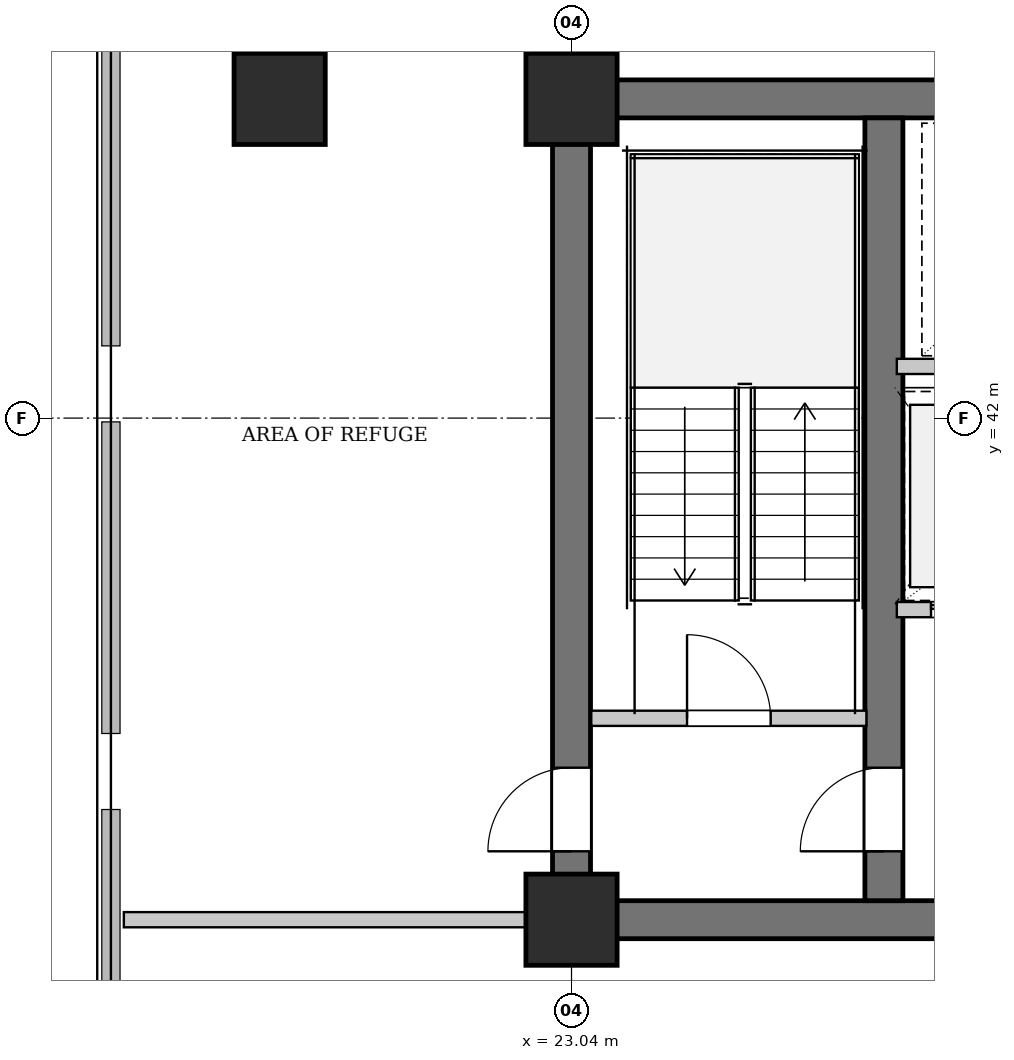
"""IFC4 building model, lengths in metres.
Left out: names, types, materials, properties, quantities, classifications, styles, units other than length and angle.
Written with IfcOpenShell. Run it as: python <this file> out.ifc"""

import sys

from ifc_helpers import new_model, si_unit, direction, frame, frame_2d, origin, origin_2d, place, context, subcontext, project, spatial, rectangle, extrude, element, fill, save


model = new_model("IFC4")
c1 = context("Model", 3, precision=1e-05, world=origin(), true_north=direction((0.0, 1.0)))
c2 = subcontext(c1, "Body", "Model", "MODEL_VIEW")
j1 = project(units=[si_unit("LENGTHUNIT", "METRE"), si_unit("PLANEANGLEUNIT", "RADIAN")], contexts=[c1])
p1 = place(None, origin())
s1 = spatial("IfcSite", under=j1, at=p1, CompositionType="ELEMENT")
p2 = place(p1, origin())
s2 = spatial("IfcBuilding", under=s1, at=p2, CompositionType="ELEMENT")
p3 = place(p2, frame((0.0, 0.0, 81.9)))
s3 = spatial("IfcBuildingStorey", under=s2, at=p3, CompositionType="ELEMENT", Elevation=81.9)
p4 = place(p3, frame((22.79, 46.2, 0.0), z_axis=(0.0, 0.0, 1.0), x_axis=(1.0, 0.0, 0.0)))
e1 = element("IfcWall", 1, at=p4, inside=s3, PredefinedType="SHEAR", context=c2, shape_type="SweptSolid", body=[
    extrude(rectangle(XDim=31.22, YDim=0.5, at=frame_2d((15.61, 0.0))), origin(), (0.0, 0.0, 1.0), 3.48),
])
p5 = place(p3, frame((22.79, 35.4, 0.0), z_axis=(0.0, 0.0, 1.0), x_axis=(1.0, 0.0, 0.0)))
e2 = element("IfcWall", 2, at=p5, inside=s3, PredefinedType="SHEAR", context=c2, shape_type="SweptSolid", body=[
    extrude(rectangle(XDim=5.41, YDim=0.5, at=frame_2d((2.705, 0.0))), origin(), (0.0, 0.0, 1.0), 3.48),
])
p6 = place(p3, frame((23.04, 35.65, 0.0), z_axis=(0.0, 0.0, 1.0), x_axis=(0.0, 1.0, 0.0)))
e3 = element("IfcWall", 3, at=p6, inside=s3, PredefinedType="SHEAR", context=c2, shape_type="SweptSolid", body=[
    extrude(rectangle(XDim=10.3, YDim=0.5, at=frame_2d((5.15, 0.0))), origin(), (0.0, 0.0, 1.0), 3.48),
])
p7 = place(p6, frame((0.65, 0.0, 0.0)))
e4 = element("IfcOpeningElement", 4, at=p7, cuts=e3, PredefinedType="OPENING", context=c2, shape_type="SweptSolid", body=[
    extrude(rectangle(XDim=1.1, YDim=2.15, at=frame_2d((0.55, 1.075))), frame((0.0, 0.26, 0.0), z_axis=(0.0, -1.0, 0.0), x_axis=(1.0, 0.0, 0.0)), (0.0, 0.0, 1.0), 0.52),
])
p8 = place(p3, frame((27.15, 35.65, 0.0), z_axis=(0.0, 0.0, 1.0), x_axis=(0.0, 1.0, 0.0)))
e5 = element("IfcWall", 5, at=p8, inside=s3, PredefinedType="SHEAR", context=c2, shape_type="SweptSolid", body=[
    extrude(rectangle(XDim=10.3, YDim=0.5, at=frame_2d((5.15, 0.0))), origin(), (0.0, 0.0, 1.0), 3.48),
])
p9 = place(p8, frame((0.65, 0.0, 0.0)))
e6 = element("IfcOpeningElement", 6, at=p9, cuts=e5, PredefinedType="OPENING", context=c2, shape_type="SweptSolid", body=[
    extrude(rectangle(XDim=1.1, YDim=2.15, at=frame_2d((0.55, 1.075))), frame((0.0, 0.26, 0.0), z_axis=(0.0, -1.0, 0.0), x_axis=(1.0, 0.0, 0.0)), (0.0, 0.0, 1.0), 0.52),
])
for number, where, z_axis, x_axis in (
    (7, (23.04, 35.4, 0.0), (0.0, 0.0, 1.0), (1.0, 0.0, 0.0)),
    (8, (23.04, 46.2, 0.0), (0.0, 0.0, 1.0), (1.0, 0.0, 0.0)),
    (9, (19.2, 46.2, 0.0), (0.0, 0.0, 1.0), (1.0, 0.0, 0.0)),
):
    element("IfcColumn", number, at=place(p3, frame(where, z_axis=z_axis, x_axis=x_axis)), inside=s3, PredefinedType="COLUMN", context=c2, shape_type="SweptSolid", body=[
        extrude(rectangle(XDim=1.2, YDim=1.2, at=origin_2d()), origin(), (0.0, 0.0, 1.0), 3.9),
    ])
p10 = place(p3, frame((23.3, 38.05, 0.0), z_axis=(0.0, 0.0, 1.0), x_axis=(1.0, 0.0, 0.0)))
e10 = element("IfcWall", 10, at=p10, inside=s3, PredefinedType="PARTITIONING", context=c2, shape_type="SweptSolid", body=[
    extrude(rectangle(XDim=3.62, YDim=0.2, at=frame_2d((1.81, 0.0))), origin(), (0.0, 0.0, 1.0), 3.48),
])
p11 = place(p10, frame((1.26, 0.0, 0.0)))
e11 = element("IfcOpeningElement", 11, at=p11, cuts=e10, PredefinedType="OPENING", context=c2, shape_type="SweptSolid", body=[
    extrude(rectangle(XDim=1.1, YDim=2.15, at=frame_2d((0.55, 1.075))), frame((0.0, 0.11, 0.0), z_axis=(0.0, -1.0, 0.0), x_axis=(1.0, 0.0, 0.0)), (0.0, 0.0, 1.0), 0.22),
])
p12 = place(p3, frame((27.32, 39.48, 0.0), z_axis=(0.0, 0.0, 1.0), x_axis=(1.0, 0.0, 0.0)))
e12 = element("IfcWall", 12, at=p12, inside=s3, PredefinedType="PARTITIONING", context=c2, shape_type="SweptSolid", body=[
    extrude(rectangle(XDim=3.94, YDim=0.2, at=frame_2d((1.97, 0.0))), origin(), (0.0, 0.0, 1.0), 3.48),
])
p13 = place(p12, frame((0.45, 0.0, 0.0)))
e13 = element("IfcOpeningElement", 13, at=p13, cuts=e12, PredefinedType="OPENING", context=c2, shape_type="SweptSolid", body=[
    extrude(rectangle(XDim=1.1, YDim=2.2, at=frame_2d((0.55, 1.1))), frame((0.0, 0.11, 0.0), z_axis=(0.0, -1.0, 0.0), x_axis=(1.0, 0.0, 0.0)), (0.0, 0.0, 1.0), 0.22),
])
p14 = place(p12, frame((2.41, 0.0, 0.0)))
e14 = element("IfcOpeningElement", 14, at=p14, cuts=e12, PredefinedType="OPENING", context=c2, shape_type="SweptSolid", body=[
    extrude(rectangle(XDim=1.1, YDim=2.2, at=frame_2d((0.55, 1.1))), frame((0.0, 0.11, 0.0), z_axis=(0.0, -1.0, 0.0), x_axis=(1.0, 0.0, 0.0)), (0.0, 0.0, 1.0), 0.22),
])
p15 = place(p3, frame((27.32, 42.68, 0.0), z_axis=(0.0, 0.0, 1.0), x_axis=(1.0, 0.0, 0.0)))
e15 = element("IfcWall", 15, at=p15, inside=s3, PredefinedType="PARTITIONING", context=c2, shape_type="SweptSolid", body=[
    extrude(rectangle(XDim=5.33, YDim=0.2, at=frame_2d((2.665, 0.0))), origin(), (0.0, 0.0, 1.0), 3.48),
])
p16 = place(p15, frame((4.18, 0.0, 0.0)))
e16 = element("IfcOpeningElement", 16, at=p16, cuts=e15, PredefinedType="OPENING", context=c2, shape_type="SweptSolid", body=[
    extrude(rectangle(XDim=0.9, YDim=2.15, at=frame_2d((0.45, 1.075))), frame((0.0, 0.11, 0.0), z_axis=(0.0, -1.0, 0.0), x_axis=(1.0, 0.0, 0.0)), (0.0, 0.0, 1.0), 0.22),
])
p17 = place(p3, frame((17.15, 35.4, 0.0), z_axis=(0.0, 0.0, 1.0), x_axis=(1.0, 0.0, 0.0)))
e17 = element("IfcWall", 17, at=p17, inside=s3, PredefinedType="PARTITIONING", context=c2, shape_type="SweptSolid", body=[
    extrude(rectangle(XDim=5.6, YDim=0.2, at=frame_2d((2.8, 0.0))), origin(), (0.0, 0.0, 1.0), 3.48),
])
p18 = place(p11, origin())
e18 = element("IfcDoor", 18, at=p18, inside=s3, OperationType="SINGLE_SWING_LEFT", PredefinedType="DOOR", context=c2, shape_type="SweptSolid", body=[
    extrude(rectangle(XDim=1.1, YDim=2.15, at=frame_2d((0.55, 1.075))), frame((0.0, 0.025, 0.0), z_axis=(0.0, -1.0, 0.0), x_axis=(1.0, 0.0, 0.0)), (0.0, 0.0, 1.0), 0.05),
])
fill(e11, e18)
p19 = place(p13, origin())
e19 = element("IfcDoor", 19, at=p19, inside=s3, OperationType="DOUBLE_DOOR_SLIDING", PredefinedType="DOOR", context=c2, shape_type="SweptSolid", body=[
    extrude(rectangle(XDim=1.1, YDim=2.2, at=frame_2d((0.55, 1.1))), frame((0.0, 0.025, 0.0), z_axis=(0.0, -1.0, 0.0), x_axis=(1.0, 0.0, 0.0)), (0.0, 0.0, 1.0), 0.05),
])
fill(e13, e19)
p20 = place(p9, origin())
e20 = element("IfcDoor", 20, at=p20, inside=s3, OperationType="SINGLE_SWING_LEFT", PredefinedType="DOOR", context=c2, shape_type="SweptSolid", body=[
    extrude(rectangle(XDim=1.1, YDim=2.15, at=frame_2d((0.55, 1.075))), frame((0.0, 0.025, 0.0), z_axis=(0.0, -1.0, 0.0), x_axis=(1.0, 0.0, 0.0)), (0.0, 0.0, 1.0), 0.05),
])
fill(e6, e20)
p21 = place(p7, origin())
e21 = element("IfcDoor", 21, at=p21, inside=s3, OperationType="SINGLE_SWING_LEFT", PredefinedType="DOOR", context=c2, shape_type="SweptSolid", body=[
    extrude(rectangle(XDim=1.1, YDim=2.15, at=frame_2d((0.55, 1.075))), frame((0.0, 0.025, 0.0), z_axis=(0.0, -1.0, 0.0), x_axis=(1.0, 0.0, 0.0)), (0.0, 0.0, 1.0), 0.05),
])
fill(e4, e21)
save(model, sys.argv[1])
